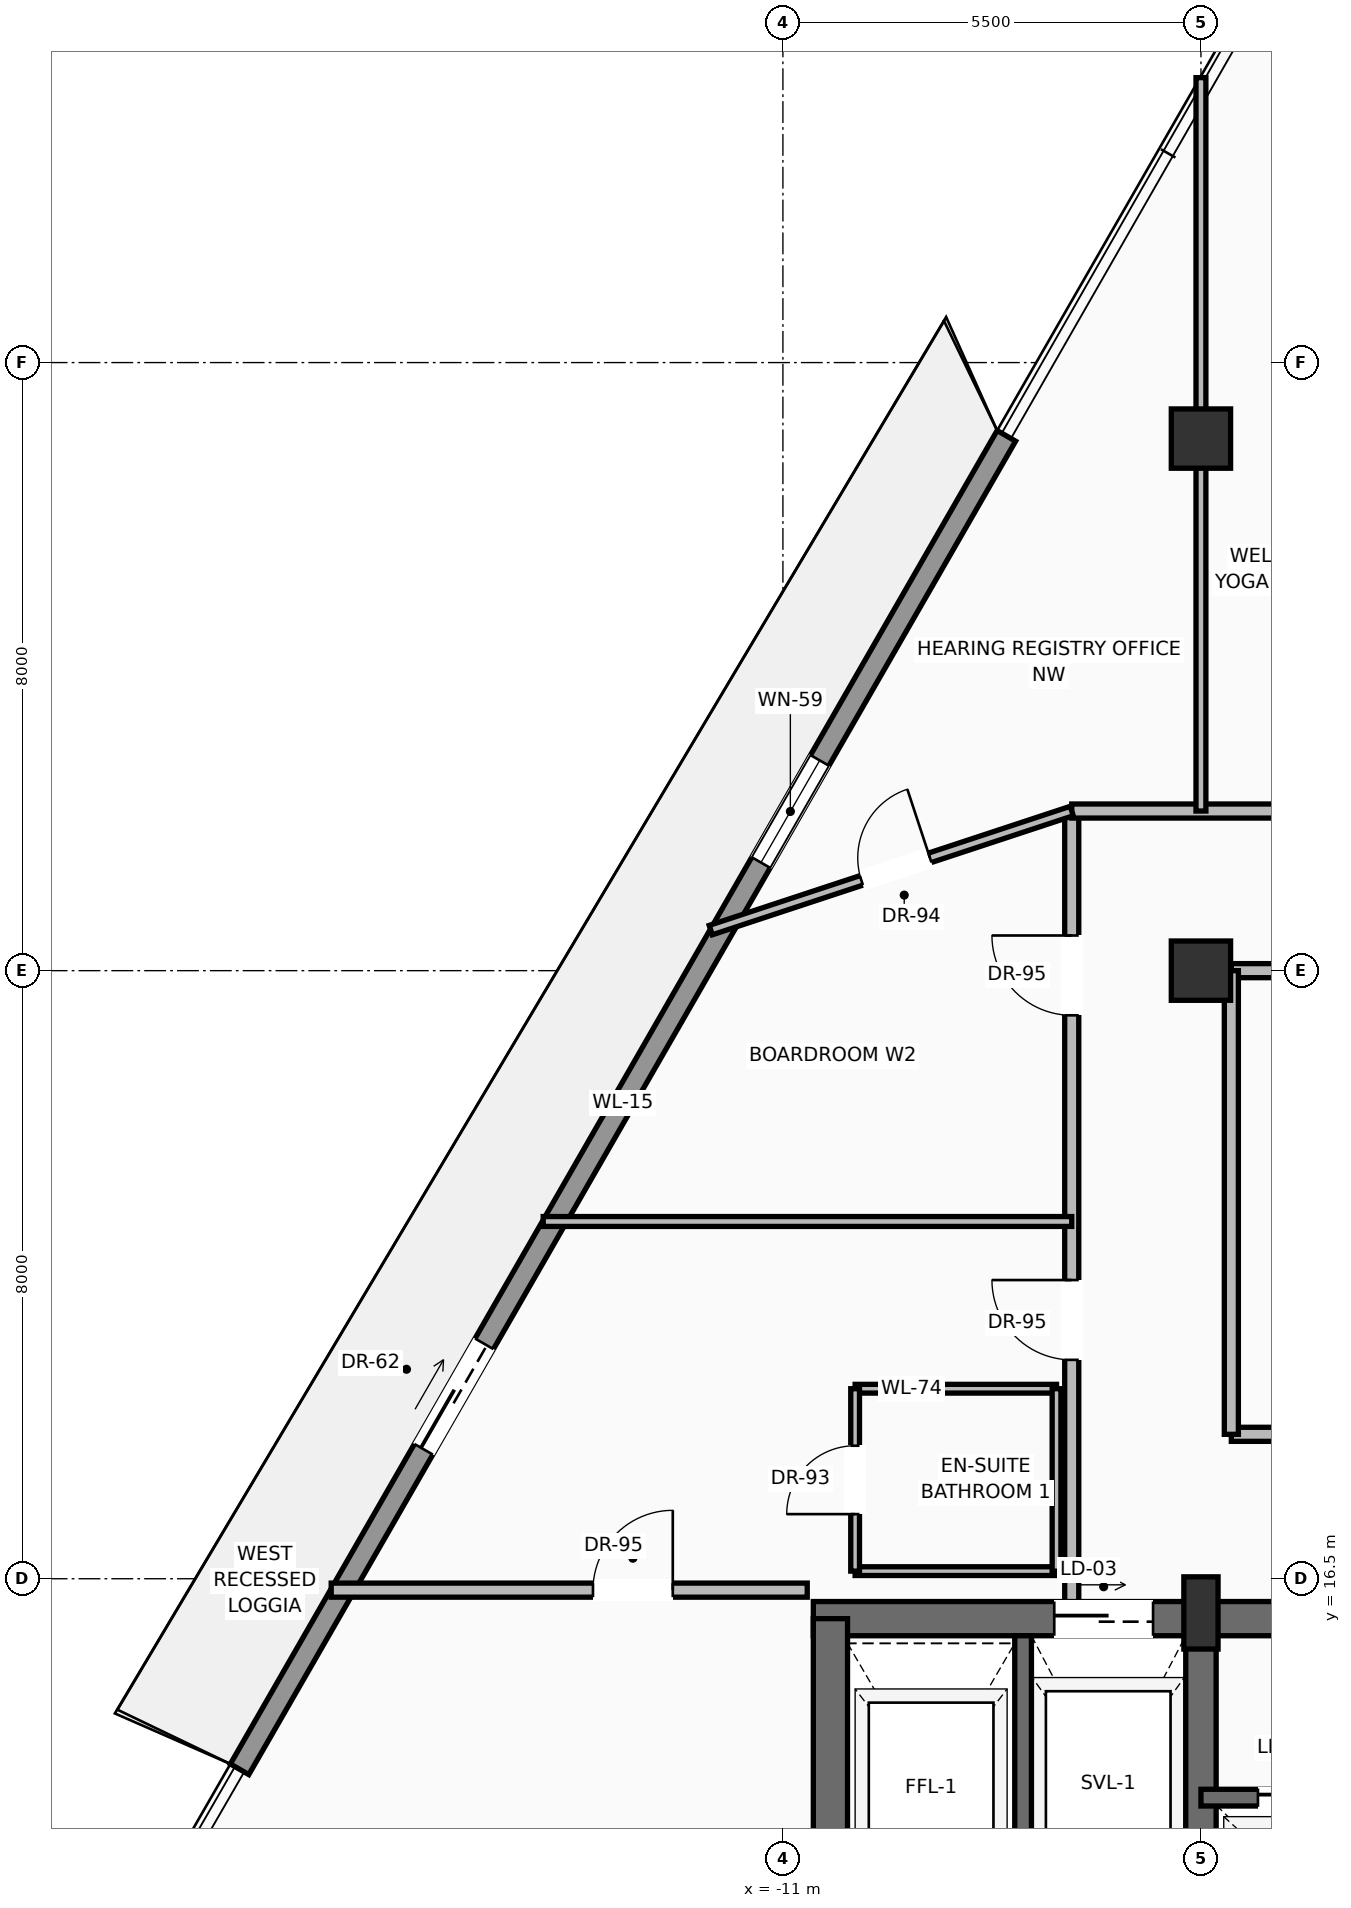
"""IFC4 building model, lengths in metres.
Left out: names, types, materials, properties, quantities, classifications, styles, units other than length and angle.
Written with IfcOpenShell. Run it as: python <this file> out.ifc"""

import sys

from ifc_helpers import new_model, si_unit, direction, frame, frame_2d, origin, origin_2d, place, context, subcontext, project, spatial, rectangle, extrude, source, transform, mapped, element, fill, save


model = new_model("IFC4")
c1 = context("Model", 3, precision=1e-05, world=origin(), true_north=direction((0.0, 1.0)))
c2 = subcontext(c1, "Body", "Model", "MODEL_VIEW")
j1 = project(units=[si_unit("LENGTHUNIT", "METRE"), si_unit("PLANEANGLEUNIT", "RADIAN")], contexts=[c1])
p1 = place(None, origin())
s1 = spatial("IfcSite", under=j1, at=p1, CompositionType="ELEMENT")
p2 = place(p1, origin())
s2 = spatial("IfcBuilding", under=s1, at=p2, CompositionType="ELEMENT")
p3 = place(p2, frame((0.0, 0.0, 286.8)))
s3 = spatial("IfcBuildingStorey", under=s2, at=p3, CompositionType="ELEMENT", Elevation=286.8)
p4 = place(p3, frame((-10.6, 15.975, 0.0), z_axis=(0.0, 0.0, 1.0), x_axis=(1.0, 0.0, 0.0)))
e1 = element("IfcWall", 1, at=p4, inside=s3, PredefinedType="SHEAR", context=c2, shape_type="SweptSolid", body=[
    extrude(rectangle(XDim=21.2, YDim=0.45, at=frame_2d((10.6, 0.0))), origin(), (0.0, 0.0, 1.0), 3.24),
])
p5 = place(p4, frame((3.17, 0.0, 0.0)))
e2 = element("IfcOpeningElement", 2, at=p5, cuts=e1, PredefinedType="OPENING", context=c2, shape_type="SweptSolid", body=[
    extrude(rectangle(XDim=1.3, YDim=2.3, at=frame_2d((0.65, 1.15))), frame((0.0, 0.235, 0.0), z_axis=(0.0, -1.0, 0.0), x_axis=(1.0, 0.0, 0.0)), (0.0, 0.0, 1.0), 0.47),
])
p6 = place(p4, frame((9.6, 0.0, 0.0)))
e3 = element("IfcOpeningElement", 3, at=p6, cuts=e1, PredefinedType="OPENING", context=c2, shape_type="SweptSolid", body=[
    extrude(rectangle(XDim=2.0, YDim=2.4, at=frame_2d((1.0, 1.2))), frame((0.0, 0.235, 0.0), z_axis=(0.0, -1.0, 0.0), x_axis=(1.0, 0.0, 0.0)), (0.0, 0.0, 1.0), 0.47),
])
p7 = place(p3, frame((-10.375, 0.625, 0.0), z_axis=(0.0, 0.0, 1.0), x_axis=(0.0, 1.0, 0.0)))
e4 = element("IfcWall", 4, at=p7, inside=s3, PredefinedType="SHEAR", context=c2, shape_type="SweptSolid", body=[
    extrude(rectangle(XDim=15.35, YDim=0.45, at=frame_2d((7.675, 0.0))), origin(), (0.0, 0.0, 1.0), 3.24),
])
p8 = place(p3, frame((-5.5, 0.625, 0.0), z_axis=(0.0, 0.0, 1.0), x_axis=(0.0, 1.0, 0.0)))
e5 = element("IfcWall", 5, at=p8, inside=s3, PredefinedType="SHEAR", context=c2, shape_type="SweptSolid", body=[
    extrude(rectangle(XDim=15.35, YDim=0.4, at=frame_2d((7.675, 0.0))), origin(), (0.0, 0.0, 1.0), 3.24),
])
p9 = place(p8, frame((8.875, 0.0, 0.0)))
e6 = element("IfcOpeningElement", 6, at=p9, cuts=e5, PredefinedType="OPENING", context=c2, shape_type="SweptSolid", body=[
    extrude(rectangle(XDim=1.1, YDim=2.2, at=frame_2d((0.55, 1.1))), frame((0.0, 0.21, 0.0), z_axis=(0.0, -1.0, 0.0), x_axis=(1.0, 0.0, 0.0)), (0.0, 0.0, 1.0), 0.42),
])
m1 = source(origin(), c2, "Body", "SweptSolid", [
    extrude(rectangle(XDim=0.45, YDim=0.95, at=origin_2d()), origin(), (0.0, 0.0, 1.0), 3.45),
])
p10 = place(p3, frame((-5.5, 16.05, 0.0), z_axis=(0.0, 0.0, 1.0), x_axis=(1.0, 0.0, 0.0)))
e7 = element("IfcColumn", 7, at=p10, inside=s3, PredefinedType="PILASTER", context=c2, shape_type="MappedRepresentation", body=[
    mapped(m1, transform((0.0, 0.0, 0.0), scale=1.0)),
])
m2 = source(origin(), c2, "Body", "SweptSolid", [
    extrude(rectangle(XDim=0.78, YDim=0.78, at=origin_2d()), origin(), (0.0, 0.0, 1.0), 3.45),
])
for number, where, z_axis, x_axis in (
    (8, (-5.5, 24.5, 0.0), (0.0, 0.0, 1.0), (1.0, 0.0, 0.0)),
    (9, (-5.5, 31.5, 0.0), (0.0, 0.0, 1.0), (1.0, 0.0, 0.0)),
):
    element("IfcColumn", number, at=place(p3, frame(where, z_axis=z_axis, x_axis=x_axis)), inside=s3, PredefinedType="COLUMN", context=c2, shape_type="MappedRepresentation", body=[
        mapped(m2, transform((0.0, 0.0, 0.0), scale=1.0)),
    ])
p11 = place(p3, frame((-18.148, 13.993, 0.0), z_axis=(0.0, 0.0, 1.0), x_axis=(0.498516004102, 0.866880495601, 0.0)))
e10 = element("IfcWall", 10, at=p11, inside=s3, PredefinedType="SOLIDWALL", context=c2, shape_type="SweptSolid", body=[
    extrude(rectangle(XDim=20.236, YDim=0.28, at=frame_2d((10.118, 0.0))), origin(), (0.0, 0.0, 1.0), 2.82),
])
p12 = place(p11, frame((4.857, 0.0, 0.0)))
e11 = element("IfcOpeningElement", 11, at=p12, cuts=e10, PredefinedType="OPENING", context=c2, shape_type="SweptSolid", body=[
    extrude(rectangle(XDim=1.6, YDim=2.35, at=frame_2d((0.8, 1.175))), frame((0.0, 0.15, 0.0), z_axis=(0.0, -1.0, 0.0), x_axis=(1.0, 0.0, 0.0)), (0.0, 0.0, 1.0), 0.3),
])
p13 = place(p11, frame((13.761, 0.0, 0.9)))
e12 = element("IfcOpeningElement", 12, at=p13, cuts=e10, PredefinedType="OPENING", context=c2, shape_type="SweptSolid", body=[
    extrude(rectangle(XDim=1.55, YDim=1.75, at=frame_2d((0.775, 0.875))), frame((0.0, 0.15, 0.0), z_axis=(0.0, -1.0, 0.0), x_axis=(1.0, 0.0, 0.0)), (0.0, 0.0, 1.0), 0.3),
])
p14 = place(p3, frame((-7.84, 11.87, 0.0), z_axis=(0.0, 0.0, 1.0), x_axis=(0.0, 1.0, 0.0)))
e13 = element("IfcWall", 13, at=p14, inside=s3, PredefinedType="SOLIDWALL", context=c2, shape_type="SweptSolid", body=[
    extrude(rectangle(XDim=3.88, YDim=0.22, at=frame_2d((1.94, 0.0))), origin(), (0.0, 0.0, 1.0), 3.24),
])
p15 = place(p3, frame((-5.5, 13.62, 0.0), z_axis=(0.0, 0.0, 1.0), x_axis=(1.0, 0.0, 0.0)))
e14 = element("IfcWall", 14, at=p15, inside=s3, PredefinedType="SOLIDWALL", context=c2, shape_type="SweptSolid", body=[
    extrude(rectangle(XDim=7.32, YDim=0.22, at=frame_2d((3.66, 0.0))), origin(), (0.0, 0.0, 1.0), 3.24),
])
p16 = place(p15, frame((0.75, 0.0, 0.0)))
e15 = element("IfcOpeningElement", 15, at=p16, cuts=e14, PredefinedType="OPENING", context=c2, shape_type="SweptSolid", body=[
    extrude(rectangle(XDim=1.1, YDim=2.2, at=frame_2d((0.55, 1.1))), frame((0.0, 0.12, 0.0), z_axis=(0.0, -1.0, 0.0), x_axis=(1.0, 0.0, 0.0)), (0.0, 0.0, 1.0), 0.24),
])
p17 = place(p15, frame((3.15, 0.0, 0.0)))
e16 = element("IfcOpeningElement", 16, at=p17, cuts=e14, PredefinedType="OPENING", context=c2, shape_type="SweptSolid", body=[
    extrude(rectangle(XDim=1.1, YDim=2.2, at=frame_2d((0.55, 1.1))), frame((0.0, 0.12, 0.0), z_axis=(0.0, -1.0, 0.0), x_axis=(1.0, 0.0, 0.0)), (0.0, 0.0, 1.0), 0.24),
])
p18 = place(p15, frame((5.55, 0.0, 0.0)))
e17 = element("IfcOpeningElement", 17, at=p18, cuts=e14, PredefinedType="OPENING", context=c2, shape_type="SweptSolid", body=[
    extrude(rectangle(XDim=1.1, YDim=2.2, at=frame_2d((0.55, 1.1))), frame((0.0, 0.12, 0.0), z_axis=(0.0, -1.0, 0.0), x_axis=(1.0, 0.0, 0.0)), (0.0, 0.0, 1.0), 0.24),
])
p19 = place(p3, frame((-5.1, 18.4, 0.0), z_axis=(0.0, 0.0, 1.0), x_axis=(1.0, 0.0, 0.0)))
e18 = element("IfcWall", 18, at=p19, inside=s3, PredefinedType="PARTITIONING", context=c2, shape_type="SweptSolid", body=[
    extrude(rectangle(XDim=10.2, YDim=0.185, at=frame_2d((5.1, 0.0))), origin(), (0.0, 0.0, 1.0), 3.232),
])
p20 = place(p19, frame((4.625, 0.0, 0.0)))
e19 = element("IfcOpeningElement", 19, at=p20, cuts=e18, PredefinedType="OPENING", context=c2, shape_type="SweptSolid", body=[
    extrude(rectangle(XDim=0.95, YDim=2.2, at=frame_2d((0.475, 1.1))), frame((0.0, 0.103, 0.0), z_axis=(0.0, -1.0, 0.0), x_axis=(1.0, 0.0, 0.0)), (0.0, 0.0, 1.0), 0.205),
])
p21 = place(p3, frame((-5.1, 24.5, 0.0), z_axis=(0.0, 0.0, 1.0), x_axis=(1.0, 0.0, 0.0)))
e20 = element("IfcWall", 20, at=p21, inside=s3, PredefinedType="PARTITIONING", context=c2, shape_type="SweptSolid", body=[
    extrude(rectangle(XDim=10.2, YDim=0.185, at=frame_2d((5.1, 0.0))), origin(), (0.0, 0.0, 1.0), 2.683),
])
p22 = place(p21, frame((4.625, 0.0, 0.0)))
e21 = element("IfcOpeningElement", 21, at=p22, cuts=e20, PredefinedType="OPENING", context=c2, shape_type="SweptSolid", body=[
    extrude(rectangle(XDim=0.95, YDim=2.2, at=frame_2d((0.475, 1.1))), frame((0.0, 0.103, 0.0), z_axis=(0.0, -1.0, 0.0), x_axis=(1.0, 0.0, 0.0)), (0.0, 0.0, 1.0), 0.205),
])
p23 = place(p3, frame((-5.1, 18.4, 0.0), z_axis=(0.0, 0.0, 1.0), x_axis=(0.0, 1.0, 0.0)))
e22 = element("IfcWall", 22, at=p23, inside=s3, PredefinedType="PARTITIONING", context=c2, shape_type="SweptSolid", body=[
    extrude(rectangle(XDim=6.1, YDim=0.185, at=frame_2d((3.05, 0.0))), origin(), (0.0, 0.0, 1.0), 3.232),
])
p24 = place(p3, frame((-7.2, 16.2, 0.0), z_axis=(0.0, 0.0, 1.0), x_axis=(0.0, 1.0, 0.0)))
e23 = element("IfcWall", 23, at=p24, inside=s3, PredefinedType="PARTITIONING", context=c2, shape_type="SweptSolid", body=[
    extrude(rectangle(XDim=10.4, YDim=0.185, at=frame_2d((5.2, 0.0))), origin(), (0.0, 0.0, 1.0), 3.232),
])
p25 = place(p24, frame((3.18, 0.0, 0.0)))
e24 = element("IfcOpeningElement", 24, at=p25, cuts=e23, PredefinedType="OPENING", context=c2, shape_type="SweptSolid", body=[
    extrude(rectangle(XDim=1.05, YDim=2.25, at=frame_2d((0.525, 1.125))), frame((0.0, 0.103, 0.0), z_axis=(0.0, -1.0, 0.0), x_axis=(1.0, 0.0, 0.0)), (0.0, 0.0, 1.0), 0.205),
])
p26 = place(p24, frame((7.712, 0.0, 0.0)))
e25 = element("IfcOpeningElement", 25, at=p26, cuts=e23, PredefinedType="OPENING", context=c2, shape_type="SweptSolid", body=[
    extrude(rectangle(XDim=1.05, YDim=2.25, at=frame_2d((0.525, 1.125))), frame((0.0, 0.103, 0.0), z_axis=(0.0, -1.0, 0.0), x_axis=(1.0, 0.0, 0.0)), (0.0, 0.0, 1.0), 0.205),
])
p27 = place(p3, frame((-7.2, 26.6, 0.0), z_axis=(0.0, 0.0, 1.0), x_axis=(1.0, 0.0, 0.0)))
e26 = element("IfcWall", 26, at=p27, inside=s3, PredefinedType="PARTITIONING", context=c2, shape_type="SweptSolid", body=[
    extrude(rectangle(XDim=14.4, YDim=0.185, at=frame_2d((7.2, 0.0))), origin(), (0.0, 0.0, 1.0), 3.232),
])
p28 = place(p27, frame((4.698, 0.0, 0.0)))
e27 = element("IfcOpeningElement", 27, at=p28, cuts=e26, PredefinedType="OPENING", context=c2, shape_type="SweptSolid", body=[
    extrude(rectangle(XDim=1.05, YDim=2.25, at=frame_2d((0.525, 1.125))), frame((0.0, 0.103, 0.0), z_axis=(0.0, -1.0, 0.0), x_axis=(1.0, 0.0, 0.0)), (0.0, 0.0, 1.0), 0.205),
])
p29 = place(p27, frame((6.675, 0.0, 0.0)))
e28 = element("IfcOpeningElement", 28, at=p29, cuts=e26, PredefinedType="OPENING", context=c2, shape_type="SweptSolid", body=[
    extrude(rectangle(XDim=1.05, YDim=2.25, at=frame_2d((0.525, 1.125))), frame((0.0, 0.103, 0.0), z_axis=(0.0, -1.0, 0.0), x_axis=(1.0, 0.0, 0.0)), (0.0, 0.0, 1.0), 0.205),
])
p30 = place(p27, frame((8.653, 0.0, 0.0)))
e29 = element("IfcOpeningElement", 29, at=p30, cuts=e26, PredefinedType="OPENING", context=c2, shape_type="SweptSolid", body=[
    extrude(rectangle(XDim=1.05, YDim=2.25, at=frame_2d((0.525, 1.125))), frame((0.0, 0.103, 0.0), z_axis=(0.0, -1.0, 0.0), x_axis=(1.0, 0.0, 0.0)), (0.0, 0.0, 1.0), 0.205),
])
p31 = place(p3, frame((-16.943, 16.35, 0.0), z_axis=(0.0, 0.0, 1.0), x_axis=(1.0, 0.0, 0.0)))
e30 = element("IfcWall", 30, at=p31, inside=s3, PredefinedType="PARTITIONING", context=c2, shape_type="SweptSolid", body=[
    extrude(rectangle(XDim=6.263, YDim=0.185, at=frame_2d((3.132, 0.0))), origin(), (0.0, 0.0, 1.0), 3.232),
])
p32 = place(p31, frame((3.444, 0.0, 0.0)))
e31 = element("IfcOpeningElement", 31, at=p32, cuts=e30, PredefinedType="OPENING", context=c2, shape_type="SweptSolid", body=[
    extrude(rectangle(XDim=1.05, YDim=2.25, at=frame_2d((0.525, 1.125))), frame((0.0, 0.103, 0.0), z_axis=(0.0, -1.0, 0.0), x_axis=(1.0, 0.0, 0.0)), (0.0, 0.0, 1.0), 0.205),
])
p33 = place(p3, frame((-11.949, 25.034, 0.0), z_axis=(0.0, 0.0, 1.0), x_axis=(0.949684129383, 0.313209282108, 0.0)))
e32 = element("IfcWall", 32, at=p33, inside=s3, PredefinedType="PARTITIONING", context=c2, shape_type="SweptSolid", body=[
    extrude(rectangle(XDim=5.001, YDim=0.13, at=frame_2d((2.5, 0.0))), origin(), (0.0, 0.0, 1.0), 3.232),
])
p34 = place(p33, frame((2.087, 0.0, 0.0)))
e33 = element("IfcOpeningElement", 33, at=p34, cuts=e32, PredefinedType="OPENING", context=c2, shape_type="SweptSolid", body=[
    extrude(rectangle(XDim=0.95, YDim=2.2, at=frame_2d((0.475, 1.1))), frame((0.0, 0.075, 0.0), z_axis=(0.0, -1.0, 0.0), x_axis=(1.0, 0.0, 0.0)), (0.0, 0.0, 1.0), 0.15),
])
p35 = place(p3, frame((-5.5, 26.6, 0.0), z_axis=(0.0, 0.0, 1.0), x_axis=(0.0, 1.0, 0.0)))
e34 = element("IfcWall", 34, at=p35, inside=s3, PredefinedType="PARTITIONING", context=c2, shape_type="SweptSolid", body=[
    extrude(rectangle(XDim=9.649, YDim=0.13, at=frame_2d((4.824, 0.0))), origin(), (0.0, 0.0, 1.0), 2.683),
])
for number, where, z_axis, x_axis in (
    (35, (-10.05, 16.6, 0.0), (0.0, 0.0, 1.0), (1.0, 0.0, 0.0)),
    (36, (-10.05, 19.0, 0.0), (0.0, 0.0, 1.0), (1.0, 0.0, 0.0)),
):
    element("IfcWall", number, at=place(p3, frame(where, z_axis=z_axis, x_axis=x_axis)), inside=s3, PredefinedType="PARTITIONING", context=c2, shape_type="SweptSolid", body=[
        extrude(rectangle(XDim=2.65, YDim=0.115, at=frame_2d((1.325, 0.0))), origin(), (0.0, 0.0, 1.0), 3.232),
    ])
p36 = place(p3, frame((-10.05, 16.6, 0.0), z_axis=(0.0, 0.0, 1.0), x_axis=(0.0, 1.0, 0.0)))
e37 = element("IfcWall", 37, at=p36, inside=s3, PredefinedType="PARTITIONING", context=c2, shape_type="SweptSolid", body=[
    extrude(rectangle(XDim=2.4, YDim=0.115, at=frame_2d((1.2, 0.0))), origin(), (0.0, 0.0, 1.0), 3.232),
])
p37 = place(p36, frame((0.75, 0.0, 0.0)))
e38 = element("IfcOpeningElement", 38, at=p37, cuts=e37, PredefinedType="OPENING", context=c2, shape_type="SweptSolid", body=[
    extrude(rectangle(XDim=0.9, YDim=2.15, at=frame_2d((0.45, 1.075))), frame((0.0, 0.067, 0.0), z_axis=(0.0, -1.0, 0.0), x_axis=(1.0, 0.0, 0.0)), (0.0, 0.0, 1.0), 0.135),
])
p38 = place(p3, frame((-7.4, 16.6, 0.0), z_axis=(0.0, 0.0, 1.0), x_axis=(0.0, 1.0, 0.0)))
e39 = element("IfcWall", 39, at=p38, inside=s3, PredefinedType="PARTITIONING", context=c2, shape_type="SweptSolid", body=[
    extrude(rectangle(XDim=2.4, YDim=0.115, at=frame_2d((1.2, 0.0))), origin(), (0.0, 0.0, 1.0), 3.232),
])
p39 = place(p3, frame((-14.154, 21.2, 0.0), z_axis=(0.0, 0.0, 1.0), x_axis=(1.0, 0.0, 0.0)))
e40 = element("IfcWall", 40, at=p39, inside=s3, PredefinedType="PARTITIONING", context=c2, shape_type="SweptSolid", body=[
    extrude(rectangle(XDim=6.954, YDim=0.13, at=frame_2d((3.477, 0.0))), origin(), (0.0, 0.0, 1.0), 3.232),
])
m3 = source(origin(), c2, "Body", "SweptSolid", [
    extrude(rectangle(XDim=1.6, YDim=2.35, at=frame_2d((0.8, 1.175))), frame((0.0, 0.025, 0.0), z_axis=(0.0, -1.0, 0.0), x_axis=(1.0, 0.0, 0.0)), (0.0, 0.0, 1.0), 0.05),
])
p40 = place(p12, origin())
e41 = element("IfcDoor", 41, at=p40, inside=s3, OperationType="SLIDING_TO_LEFT", PredefinedType="DOOR", context=c2, shape_type="MappedRepresentation", body=[
    mapped(m3, transform((0.0, 0.0, 0.0), scale=1.0)),
])
fill(e11, e41)
m4 = source(origin(), c2, "Body", "SweptSolid", [
    extrude(rectangle(XDim=1.55, YDim=1.75, at=frame_2d((0.775, 0.875))), frame((0.0, 0.03, 0.0), z_axis=(0.0, -1.0, 0.0), x_axis=(1.0, 0.0, 0.0)), (0.0, 0.0, 1.0), 0.06),
])
p41 = place(p13, origin())
e42 = element("IfcWindow", 42, at=p41, inside=s3, PartitioningType="SINGLE_PANEL", PredefinedType="WINDOW", context=c2, shape_type="MappedRepresentation", body=[
    mapped(m4, transform((0.0, 0.0, 0.0), scale=1.0)),
])
fill(e12, e42)
m5 = source(origin(), c2, "Body", "SweptSolid", [
    extrude(rectangle(XDim=1.3, YDim=2.3, at=frame_2d((0.65, 1.15))), frame((0.0, 0.025, 0.0), z_axis=(0.0, -1.0, 0.0), x_axis=(1.0, 0.0, 0.0)), (0.0, 0.0, 1.0), 0.05),
])
p42 = place(p5, origin())
e43 = element("IfcDoor", 43, at=p42, inside=s3, OperationType="SLIDING_TO_RIGHT", PredefinedType="DOOR", context=c2, shape_type="MappedRepresentation", body=[
    mapped(m5, transform((0.0, 0.0, 0.0), scale=1.0)),
])
fill(e2, e43)
m6 = source(origin(), c2, "Body", "SweptSolid", [
    extrude(rectangle(XDim=1.1, YDim=2.2, at=frame_2d((0.55, 1.1))), frame((0.0, 0.025, 0.0), z_axis=(0.0, -1.0, 0.0), x_axis=(1.0, 0.0, 0.0)), (0.0, 0.0, 1.0), 0.05),
])
p43 = place(p16, origin())
e44 = element("IfcDoor", 44, at=p43, inside=s3, OperationType="SLIDING_TO_RIGHT", PredefinedType="DOOR", context=c2, shape_type="MappedRepresentation", body=[
    mapped(m6, transform((0.0, 0.0, 0.0), scale=1.0)),
])
fill(e15, e44)
m7 = source(origin(), c2, "Body", "SweptSolid", [
    extrude(rectangle(XDim=1.05, YDim=2.25, at=frame_2d((0.525, 1.125))), frame((0.0, 0.025, 0.0), z_axis=(0.0, -1.0, 0.0), x_axis=(1.0, 0.0, 0.0)), (0.0, 0.0, 1.0), 0.05),
])
p44 = place(p32, origin())
e45 = element("IfcDoor", 45, at=p44, inside=s3, OperationType="SINGLE_SWING_RIGHT", PredefinedType="DOOR", context=c2, shape_type="MappedRepresentation", body=[
    mapped(m7, transform((0.0, 0.0, 0.0), scale=1.0)),
])
fill(e31, e45)
p45 = place(p25, origin())
e46 = element("IfcDoor", 46, at=p45, inside=s3, OperationType="SINGLE_SWING_RIGHT", PredefinedType="DOOR", context=c2, shape_type="MappedRepresentation", body=[
    mapped(m7, transform((0.0, 0.0, 0.0), scale=1.0)),
])
fill(e24, e46)
m8 = source(origin(), c2, "Body", "SweptSolid", [
    extrude(rectangle(XDim=0.9, YDim=2.15, at=frame_2d((0.45, 1.075))), frame((0.0, 0.025, 0.0), z_axis=(0.0, -1.0, 0.0), x_axis=(1.0, 0.0, 0.0)), (0.0, 0.0, 1.0), 0.05),
])
p46 = place(p37, origin())
e47 = element("IfcDoor", 47, at=p46, inside=s3, OperationType="SINGLE_SWING_LEFT", PredefinedType="DOOR", context=c2, shape_type="MappedRepresentation", body=[
    mapped(m8, transform((0.0, 0.0, 0.0), scale=1.0)),
])
fill(e38, e47)
p47 = place(p26, origin())
e48 = element("IfcDoor", 48, at=p47, inside=s3, OperationType="SINGLE_SWING_RIGHT", PredefinedType="DOOR", context=c2, shape_type="MappedRepresentation", body=[
    mapped(m7, transform((0.0, 0.0, 0.0), scale=1.0)),
])
fill(e25, e48)
m9 = source(origin(), c2, "Body", "SweptSolid", [
    extrude(rectangle(XDim=0.95, YDim=2.2, at=frame_2d((0.475, 1.1))), frame((0.0, 0.025, 0.0), z_axis=(0.0, -1.0, 0.0), x_axis=(1.0, 0.0, 0.0)), (0.0, 0.0, 1.0), 0.05),
])
p48 = place(p34, origin())
e49 = element("IfcDoor", 49, at=p48, inside=s3, OperationType="SINGLE_SWING_RIGHT", PredefinedType="DOOR", context=c2, shape_type="MappedRepresentation", body=[
    mapped(m9, transform((0.0, 0.0, 0.0), scale=1.0)),
])
fill(e33, e49)
save(model, sys.argv[1])
